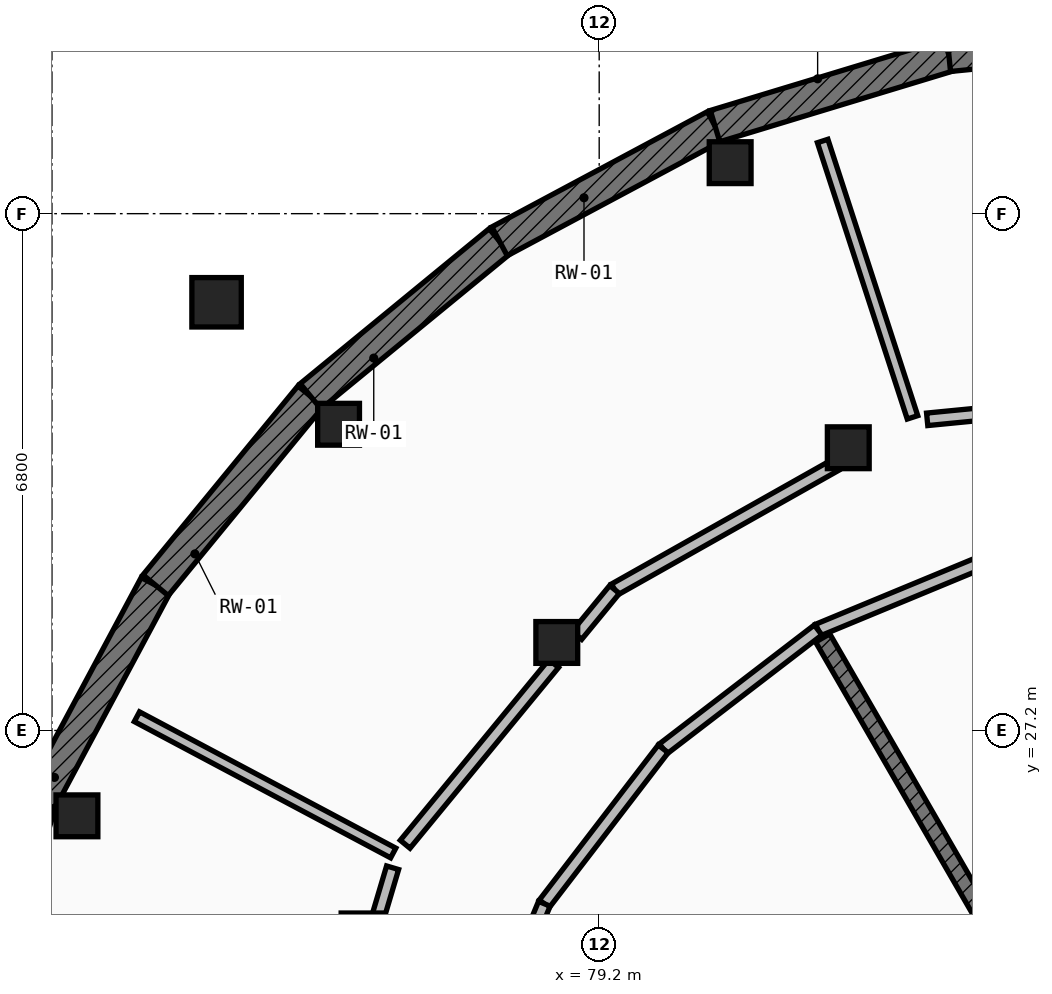
"""IFC4 building model, lengths in metres.
Left out: names, types, materials, properties, quantities, classifications, styles, units other than length and angle.
Written with IfcOpenShell. Run it as: python <this file> out.ifc"""

import sys

from ifc_helpers import new_model, si_unit, direction, frame, frame_2d, origin, origin_2d, place, context, subcontext, project, spatial, rectangle, extrude, element, fill, save


model = new_model("IFC4")
c1 = context("Model", 3, precision=1e-05, world=origin(), true_north=direction((0.0, 1.0)))
c2 = subcontext(c1, "Body", "Model", "MODEL_VIEW")
j1 = project(units=[si_unit("LENGTHUNIT", "METRE"), si_unit("PLANEANGLEUNIT", "RADIAN")], contexts=[c1])
p1 = place(None, origin())
s1 = spatial("IfcSite", under=j1, at=p1, CompositionType="ELEMENT")
p2 = place(p1, origin())
s2 = spatial("IfcBuilding", under=s1, at=p2, CompositionType="ELEMENT")
p3 = place(p2, frame((0.0, 0.0, -4.55)))
s3 = spatial("IfcBuildingStorey", under=s2, at=p3, CompositionType="ELEMENT", Elevation=-4.55)
for number, where, z_axis, x_axis in (
    (1, (80.923, 34.671, 0.0), (0.0, 0.0, 1.0), (1.0, 0.0, 0.0)),
    (2, (75.771, 31.229, 0.0), (0.0, 0.0, 1.0), (1.0, 0.0, 0.0)),
    (3, (72.329, 26.077, 0.0), (0.0, 0.0, 1.0), (1.0, 0.0, 0.0)),
    (4, (82.477, 30.92, 0.0), (0.0, 0.0, 1.0), (1.0, 0.0, 0.0)),
    (5, (78.642, 28.358, 0.0), (0.0, 0.0, 1.0), (1.0, 0.0, 0.0)),
    (6, (76.08, 24.523, 0.0), (0.0, 0.0, 1.0), (1.0, 0.0, 0.0)),
):
    element("IfcColumn", number, at=place(p3, frame(where, z_axis=z_axis, x_axis=x_axis)), inside=s3, PredefinedType="COLUMN", context=c2, shape_type="SweptSolid", body=[
        extrude(rectangle(XDim=0.55, YDim=0.55, at=origin_2d()), origin(), (0.0, 0.0, 1.0), 4.55),
    ])
p4 = place(p3, frame((74.166, 32.834, 0.0), z_axis=(0.0, 0.0, 1.0), x_axis=(1.0, 0.0, 0.0)))
e7 = element("IfcColumn", 7, at=p4, inside=s3, PredefinedType="COLUMN", context=c2, shape_type="SweptSolid", body=[
    extrude(rectangle(XDim=0.65, YDim=0.65, at=origin_2d()), origin(), (0.0, 0.0, 1.0), 4.55),
])
for number, where, z_axis, x_axis in (
    (8, (70.915, 23.199, 0.0), (0.0, 0.0, 1.0), (0.29, 0.957, 0.0)),
    (9, (71.848, 26.276, 0.0), (0.0, 0.0, 1.0), (0.472, 0.882, 0.0)),
    (10, (73.364, 29.111, 0.0), (0.0, 0.0, 1.0), (0.634, 0.773, 0.0)),
    (11, (75.403, 31.597, 0.0), (0.0, 0.0, 1.0), (0.773, 0.634, 0.0)),
    (12, (77.889, 33.636, 0.0), (0.0, 0.0, 1.0), (0.882, 0.472, 0.0)),
    (13, (80.724, 35.152, 0.0), (0.0, 0.0, 1.0), (0.957, 0.29, 0.0)),
):
    element("IfcWall", number, at=place(p3, frame(where, z_axis=z_axis, x_axis=x_axis)), inside=s3, PredefinedType="USERDEFINED", context=c2, shape_type="SweptSolid", body=[
        extrude(rectangle(XDim=3.215, YDim=0.43, at=frame_2d((1.607, 0.0))), origin(), (0.0, 0.0, 1.0), 3.335),
    ])
p5 = place(p3, frame((83.801, 36.085, 0.0), z_axis=(0.0, 0.0, 1.0), x_axis=(0.995188673637, 0.097977057849, 0.0)))
e14 = element("IfcWall", 14, at=p5, inside=s3, PredefinedType="USERDEFINED", context=c2, shape_type="SweptSolid", body=[
    extrude(rectangle(XDim=3.214, YDim=0.43, at=frame_2d((1.607, 0.0))), origin(), (0.0, 0.0, 1.0), 3.335),
])
p6 = place(p3, frame((86.55, 20.779, 0.0), z_axis=(0.0, 0.0, 1.0), x_axis=(-0.499985207697, 0.866033943956, 0.0)))
e15 = element("IfcWall", 15, at=p6, inside=s3, PredefinedType="SOLIDWALL", context=c2, shape_type="SweptSolid", body=[
    extrude(rectangle(XDim=8.821, YDim=0.215, at=frame_2d((4.41, 0.0))), origin(), (0.0, 0.0, 1.0), 2.76),
])
p7 = place(p3, frame((84.453, 29.505, 0.0), z_axis=(0.0, 0.0, 1.0), x_axis=(-0.923870848353, -0.382704397106, 0.0)))
e16 = element("IfcWall", 16, at=p7, inside=s3, PredefinedType="PARTITIONING", context=c2, shape_type="SweptSolid", body=[
    extrude(rectangle(XDim=2.568, YDim=0.165, at=frame_2d((1.284, 0.0))), origin(), (0.0, 0.0, 1.0), 2.76),
])
for number, where, z_axis, x_axis in (
    (17, (82.08, 28.522, 0.0), (0.0, 0.0, 1.0), (-0.793, -0.609, 0.0)),
    (18, (80.042, 26.958, 0.0), (0.0, 0.0, 1.0), (-0.609, -0.793, 0.0)),
):
    element("IfcWall", number, at=place(p3, frame(where, z_axis=z_axis, x_axis=x_axis)), inside=s3, PredefinedType="PARTITIONING", context=c2, shape_type="SweptSolid", body=[
        extrude(rectangle(XDim=2.569, YDim=0.165, at=frame_2d((1.285, 0.0))), origin(), (0.0, 0.0, 1.0), 2.76),
    ])
p8 = place(p3, frame((78.478, 24.92, 0.0), z_axis=(0.0, 0.0, 1.0), x_axis=(-0.382704397106, -0.923870848353, 0.0)))
e19 = element("IfcWall", 19, at=p8, inside=s3, PredefinedType="PARTITIONING", context=c2, shape_type="SweptSolid", body=[
    extrude(rectangle(XDim=2.568, YDim=0.165, at=frame_2d((1.284, 0.0))), origin(), (0.0, 0.0, 1.0), 2.76),
])
p9 = place(p3, frame((83.322, 31.32, 0.0), z_axis=(0.0, 0.0, 1.0), x_axis=(-0.309188585957, 0.951000745696, 0.0)))
e20 = element("IfcWall", 20, at=p9, inside=s3, PredefinedType="PARTITIONING", context=c2, shape_type="SweptSolid", body=[
    extrude(rectangle(XDim=3.823, YDim=0.145, at=frame_2d((1.912, 0.0))), origin(), (0.0, 0.0, 1.0), 2.76),
])
p10 = place(p3, frame((76.49, 25.588, 0.0), z_axis=(0.0, 0.0, 1.0), x_axis=(-0.882920316433, 0.469522858688, 0.0)))
e21 = element("IfcWall", 21, at=p10, inside=s3, PredefinedType="PARTITIONING", context=c2, shape_type="SweptSolid", body=[
    extrude(rectangle(XDim=3.819, YDim=0.145, at=frame_2d((1.91, 0.0))), origin(), (0.0, 0.0, 1.0), 2.76),
])
p11 = place(p3, frame((86.809, 31.616, 0.0), z_axis=(0.0, 0.0, 1.0), x_axis=(-0.995256012435, -0.09729064555, 0.0)))
e22 = element("IfcWall", 22, at=p11, inside=s3, PredefinedType="PARTITIONING", context=c2, shape_type="SweptSolid", body=[
    extrude(rectangle(XDim=3.31, YDim=0.165, at=frame_2d((1.655, 0.0))), origin(), (0.0, 0.0, 1.0), 2.76),
])
p12 = place(p3, frame((82.311, 30.695, 0.0), z_axis=(0.0, 0.0, 1.0), x_axis=(-0.871081128007, -0.491139153836, 0.0)))
e23 = element("IfcWall", 23, at=p12, inside=s3, PredefinedType="PARTITIONING", context=c2, shape_type="SweptSolid", body=[
    extrude(rectangle(XDim=3.339, YDim=0.165, at=frame_2d((1.67, 0.0))), origin(), (0.0, 0.0, 1.0), 2.76),
])
p13 = place(p12, frame((1.08, 0.0, 0.0)))
e24 = element("IfcOpeningElement", 24, at=p13, cuts=e23, PredefinedType="OPENING", context=c2, shape_type="SweptSolid", body=[
    extrude(rectangle(XDim=1.18, YDim=2.2, at=frame_2d((0.59, 1.1))), frame((0.0, 0.093, 0.0), z_axis=(0.0, -1.0, 0.0), x_axis=(1.0, 0.0, 0.0)), (0.0, 0.0, 1.0), 0.185),
])
p14 = place(p3, frame((79.402, 29.055, 0.0), z_axis=(0.0, 0.0, 1.0), x_axis=(-0.634699456668, -0.772759082577, 0.0)))
e25 = element("IfcWall", 25, at=p14, inside=s3, PredefinedType="PARTITIONING", context=c2, shape_type="SweptSolid", body=[
    extrude(rectangle(XDim=0.782, YDim=0.165, at=frame_2d((0.391, 0.0))), origin(), (0.0, 0.0, 1.0), 2.76),
])
p15 = place(p3, frame((78.602, 28.081, 0.0), z_axis=(0.0, 0.0, 1.0), x_axis=(-0.635045466024, -0.772474760806, 0.0)))
e26 = element("IfcWall", 26, at=p15, inside=s3, PredefinedType="PARTITIONING", context=c2, shape_type="SweptSolid", body=[
    extrude(rectangle(XDim=3.079, YDim=0.165, at=frame_2d((1.539, 0.0))), origin(), (0.0, 0.0, 1.0), 2.76),
])
p16 = place(p3, frame((76.482, 25.394, 0.0), z_axis=(0.0, 0.0, 1.0), x_axis=(-0.284901497141, -0.958556799009, 0.0)))
e27 = element("IfcWall", 27, at=p16, inside=s3, PredefinedType="PARTITIONING", context=c2, shape_type="SweptSolid", body=[
    extrude(rectangle(XDim=0.705, YDim=0.165, at=frame_2d((0.353, 0.0))), origin(), (0.0, 0.0, 1.0), 2.76),
])
p17 = place(p13, origin())
e28 = element("IfcDoor", 28, at=p17, inside=s3, OperationType="SINGLE_SWING_RIGHT", PredefinedType="DOOR", context=c2, shape_type="SweptSolid", body=[
    extrude(rectangle(XDim=1.18, YDim=2.2, at=frame_2d((0.59, 1.1))), frame((0.0, 0.025, 0.0), z_axis=(0.0, -1.0, 0.0), x_axis=(1.0, 0.0, 0.0)), (0.0, 0.0, 1.0), 0.05),
])
fill(e24, e28)
save(model, sys.argv[1])
